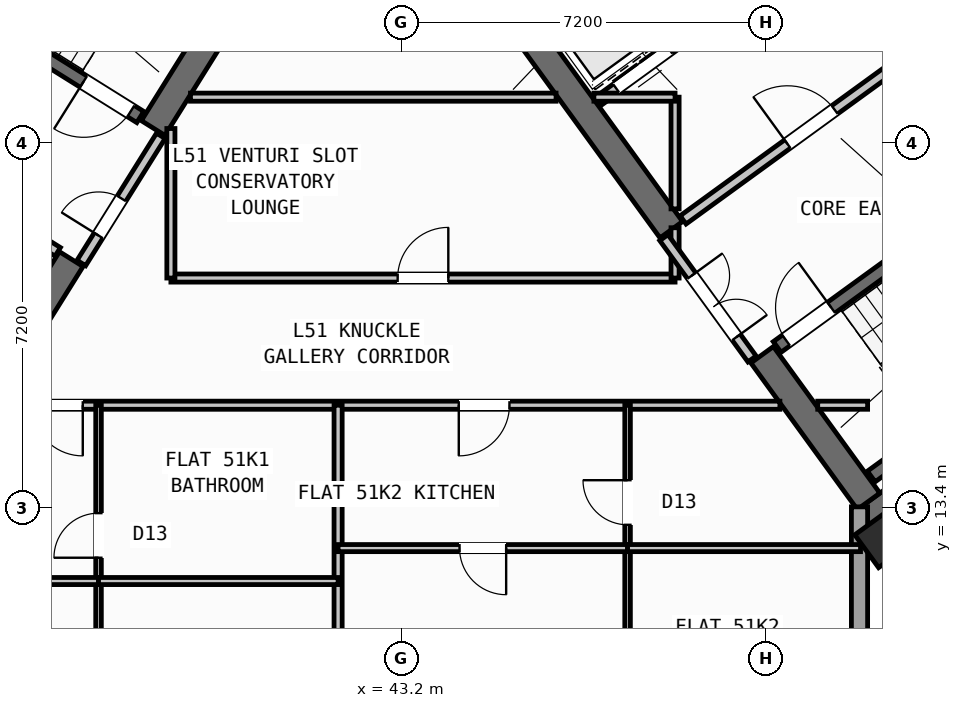
"""IFC4 building model, lengths in metres.
Left out: names, types, materials, properties, quantities, classifications, styles, units other than length and angle.
Written with IfcOpenShell. Run it as: python <this file> out.ifc"""

import sys

from ifc_helpers import new_model, si_unit, direction, frame, frame_2d, origin, origin_2d, place, context, subcontext, project, spatial, rectangle, hollow_rectangle, extrude, source, transform, mapped, element, fill, save


model = new_model("IFC4")
c1 = context("Model", 3, precision=1e-05, world=origin(), true_north=direction((0.0, 1.0)))
c2 = subcontext(c1, "Body", "Model", "MODEL_VIEW")
j1 = project(units=[si_unit("LENGTHUNIT", "METRE"), si_unit("PLANEANGLEUNIT", "RADIAN")], contexts=[c1])
p1 = place(None, origin())
s1 = spatial("IfcSite", under=j1, at=p1, CompositionType="ELEMENT")
p2 = place(p1, origin())
s2 = spatial("IfcBuilding", under=s1, at=p2, CompositionType="ELEMENT")
p3 = place(p2, frame((0.0, 0.0, 204.0)))
s3 = spatial("IfcBuildingStorey", under=s2, at=p3, CompositionType="ELEMENT", Elevation=204.0)
p4 = place(p3, frame((40.194, 23.922, 0.0), z_axis=(0.0, 0.0, 1.0), x_axis=(-0.529888438328, -0.848067357541, 0.0)))
e1 = element("IfcWall", 1, at=p4, inside=s3, PredefinedType="SHEAR", context=c2, shape_type="SweptSolid", body=[
    extrude(rectangle(XDim=3.575, YDim=0.55, at=frame_2d((1.788, 0.0))), origin(), (0.0, 0.0, 1.0), 3.35),
])
p5 = place(p3, frame((36.683, 18.304, 0.0), z_axis=(0.0, 0.0, 1.0), x_axis=(-0.529896466841, -0.848062341122, 0.0)))
e2 = element("IfcWall", 2, at=p5, inside=s3, PredefinedType="SHEAR", context=c2, shape_type="SweptSolid", body=[
    extrude(rectangle(XDim=6.425, YDim=0.55, at=frame_2d((3.212, 0.0))), origin(), (0.0, 0.0, 1.0), 3.35),
])
p6 = place(p3, frame((52.359, 13.14, 0.0), z_axis=(0.0, 0.0, 1.0), x_axis=(0.809014896919, 0.587788139183, 0.0)))
e3 = element("IfcWall", 3, at=p6, inside=s3, PredefinedType="SHEAR", context=c2, shape_type="SweptSolid", body=[
    extrude(rectangle(XDim=12.34, YDim=0.55, at=frame_2d((6.17, 0.0))), origin(), (0.0, 0.0, 1.0), 3.35),
])
p7 = place(p3, frame((52.42, 13.524, 0.0), z_axis=(0.0, 0.0, 1.0), x_axis=(-0.587802113096, 0.809004744015, 0.0)))
e4 = element("IfcWall", 4, at=p7, inside=s3, PredefinedType="SHEAR", context=c2, shape_type="SweptSolid", body=[
    extrude(rectangle(XDim=3.575, YDim=0.55, at=frame_2d((1.788, 0.0))), origin(), (0.0, 0.0, 1.0), 3.35),
])
p8 = place(p3, frame((48.526, 18.884, 0.0), z_axis=(0.0, 0.0, 1.0), x_axis=(-0.587764933797, 0.809031756236, 0.0)))
e5 = element("IfcWall", 5, at=p8, inside=s3, PredefinedType="SHEAR", context=c2, shape_type="SweptSolid", body=[
    extrude(rectangle(XDim=6.425, YDim=0.55, at=frame_2d((3.212, 0.0))), origin(), (0.0, 0.0, 1.0), 3.35),
])
m1 = source(origin(), c2, "Body", "SweptSolid", [
    extrude(hollow_rectangle(XDim=0.8, YDim=0.8, WallThickness=0.032, at=origin_2d()), origin(), (0.0, 0.0, 1.0), 3.6),
])
p9 = place(p3, frame((52.705, 12.773, 0.0), z_axis=(0.0, 0.0, 1.0), x_axis=(0.809016994375, 0.587785252292, 0.0)))
e6 = element("IfcColumn", 6, at=p9, inside=s3, PredefinedType="COLUMN", context=c2, shape_type="MappedRepresentation", body=[
    mapped(m1, transform((0.0, 0.0, 0.0), scale=1.0)),
])
p10 = place(p3, frame((52.24, 13.414, 0.0), z_axis=(0.0, 0.0, 1.0), x_axis=(0.0, -1.0, 0.0)))
e7 = element("IfcWall", 7, at=p10, inside=s3, PredefinedType="STANDARD", context=c2, shape_type="SweptSolid", body=[
    extrude(rectangle(XDim=9.948, YDim=0.32, at=frame_2d((4.974, 0.0))), origin(), (0.0, 0.0, 1.0), 3.35),
])
p11 = place(p10, frame((2.671, 0.0, 0.9)))
e8 = element("IfcOpeningElement", 8, at=p11, cuts=e7, PredefinedType="OPENING", context=c2, shape_type="SweptSolid", body=[
    extrude(rectangle(XDim=1.65, YDim=1.45, at=frame_2d((0.825, 0.725))), frame((0.0, 0.17, 0.0), z_axis=(0.0, -1.0, 0.0), x_axis=(1.0, 0.0, 0.0)), (0.0, 0.0, 1.0), 0.34),
])
p12 = place(p10, frame((7.408, 0.0, 0.9)))
e9 = element("IfcOpeningElement", 9, at=p12, cuts=e7, PredefinedType="OPENING", context=c2, shape_type="SweptSolid", body=[
    extrude(rectangle(XDim=1.35, YDim=1.45, at=frame_2d((0.675, 0.725))), frame((0.0, 0.17, 0.0), z_axis=(0.0, -1.0, 0.0), x_axis=(1.0, 0.0, 0.0)), (0.0, 0.0, 1.0), 0.34),
])
p13 = place(p3, frame((38.046, 21.108, 0.0), z_axis=(0.0, 0.0, 1.0), x_axis=(-0.848054434086, 0.529909121291, 0.0)))
e10 = element("IfcWall", 10, at=p13, inside=s3, PredefinedType="SHEAR", context=c2, shape_type="SweptSolid", body=[
    extrude(rectangle(XDim=7.33, YDim=0.26, at=frame_2d((3.665, 0.0))), origin(), (0.0, 0.0, 1.0), 3.35),
])
p14 = place(p13, frame((0.22, 0.0, 0.0)))
e11 = element("IfcOpeningElement", 11, at=p14, cuts=e10, PredefinedType="OPENING", context=c2, shape_type="SweptSolid", body=[
    extrude(rectangle(XDim=1.1, YDim=2.1, at=frame_2d((0.55, 1.05))), frame((0.0, 0.14, 0.0), z_axis=(0.0, -1.0, 0.0), x_axis=(1.0, 0.0, 0.0)), (0.0, 0.0, 1.0), 0.28),
])
p15 = place(p3, frame((36.417, 18.447, 0.0), z_axis=(0.0, 0.0, 1.0), x_axis=(-0.848064879198, 0.529892404805, 0.0)))
e12 = element("IfcWall", 12, at=p15, inside=s3, PredefinedType="STANDARD", context=c2, shape_type="SweptSolid", body=[
    extrude(rectangle(XDim=5.768, YDim=0.2, at=frame_2d((2.884, 0.0))), origin(), (0.0, 0.0, 1.0), 3.34),
])
p16 = place(p15, frame((2.548, 0.0, 0.0)))
e13 = element("IfcOpeningElement", 13, at=p16, cuts=e12, PredefinedType="OPENING", context=c2, shape_type="SweptSolid", body=[
    extrude(rectangle(XDim=1.15, YDim=2.1, at=frame_2d((0.575, 1.05))), frame((0.0, 0.11, 0.0), z_axis=(0.0, -1.0, 0.0), x_axis=(1.0, 0.0, 0.0)), (0.0, 0.0, 1.0), 0.22),
])
p17 = place(p3, frame((52.472, 14.013, 0.0), z_axis=(0.0, 0.0, 1.0), x_axis=(0.809028366311, 0.587769599847, 0.0)))
e14 = element("IfcWall", 14, at=p17, inside=s3, PredefinedType="SHEAR", context=c2, shape_type="SweptSolid", body=[
    extrude(rectangle(XDim=7.33, YDim=0.26, at=frame_2d((3.665, 0.0))), origin(), (0.0, 0.0, 1.0), 3.35),
])
p18 = place(p3, frame((50.615, 16.57, 0.0), z_axis=(0.0, 0.0, 1.0), x_axis=(0.809028366311, 0.587769599847, 0.0)))
e15 = element("IfcWall", 15, at=p18, inside=s3, PredefinedType="SHEAR", context=c2, shape_type="SweptSolid", body=[
    extrude(rectangle(XDim=7.33, YDim=0.26, at=frame_2d((3.665, 0.0))), origin(), (0.0, 0.0, 1.0), 3.35),
])
p19 = place(p18, frame((0.22, 0.0, 0.0)))
e16 = element("IfcOpeningElement", 16, at=p19, cuts=e15, PredefinedType="OPENING", context=c2, shape_type="SweptSolid", body=[
    extrude(rectangle(XDim=1.1, YDim=2.1, at=frame_2d((0.55, 1.05))), frame((0.0, 0.14, 0.0), z_axis=(0.0, -1.0, 0.0), x_axis=(1.0, 0.0, 0.0)), (0.0, 0.0, 1.0), 0.28),
])
p20 = place(p3, frame((47.065, 21.407, 0.0), z_axis=(0.0, 0.0, 1.0), x_axis=(0.809032984992, 0.587763242466, 0.0)))
e17 = element("IfcWall", 17, at=p20, inside=s3, PredefinedType="STANDARD", context=c2, shape_type="SweptSolid", body=[
    extrude(rectangle(XDim=3.448, YDim=0.2, at=frame_2d((1.724, 0.0))), origin(), (0.0, 0.0, 1.0), 3.34),
])
p21 = place(p20, frame((0.458, 0.0, 0.0)))
e18 = element("IfcOpeningElement", 18, at=p21, cuts=e17, PredefinedType="OPENING", context=c2, shape_type="SweptSolid", body=[
    extrude(rectangle(XDim=1.3, YDim=2.2, at=frame_2d((0.65, 1.1))), frame((0.0, 0.11, 0.0), z_axis=(0.0, -1.0, 0.0), x_axis=(1.0, 0.0, 0.0)), (0.0, 0.0, 1.0), 0.22),
])
p22 = place(p3, frame((48.758, 19.077, 0.0), z_axis=(0.0, 0.0, 1.0), x_axis=(0.809005065155, 0.587801671104, 0.0)))
e19 = element("IfcWall", 19, at=p22, inside=s3, PredefinedType="STANDARD", context=c2, shape_type="SweptSolid", body=[
    extrude(rectangle(XDim=5.768, YDim=0.2, at=frame_2d((2.884, 0.0))), origin(), (0.0, 0.0, 1.0), 3.34),
])
p23 = place(p22, frame((2.548, 0.0, 0.0)))
e20 = element("IfcOpeningElement", 20, at=p23, cuts=e19, PredefinedType="OPENING", context=c2, shape_type="SweptSolid", body=[
    extrude(rectangle(XDim=1.15, YDim=2.1, at=frame_2d((0.575, 1.05))), frame((0.0, 0.11, 0.0), z_axis=(0.0, -1.0, 0.0), x_axis=(1.0, 0.0, 0.0)), (0.0, 0.0, 1.0), 0.22),
])
p24 = place(p3, frame((38.451, 20.737, 0.0), z_axis=(0.0, 0.0, 1.0), x_axis=(-0.529924799939, -0.848044637038, 0.0)))
e21 = element("IfcWall", 21, at=p24, inside=s3, PredefinedType="STANDARD", context=c2, shape_type="SweptSolid", body=[
    extrude(rectangle(XDim=2.96, YDim=0.2, at=frame_2d((1.48, 0.0))), origin(), (0.0, 0.0, 1.0), 3.34),
])
p25 = place(p24, frame((1.46, 0.0, 0.0)))
e22 = element("IfcOpeningElement", 22, at=p25, cuts=e21, PredefinedType="OPENING", context=c2, shape_type="SweptSolid", body=[
    extrude(rectangle(XDim=0.86, YDim=2.05, at=frame_2d((0.43, 1.025))), frame((0.0, 0.11, 0.0), z_axis=(0.0, -1.0, 0.0), x_axis=(1.0, 0.0, 0.0)), (0.0, 0.0, 1.0), 0.22),
])
p26 = place(p3, frame((35.237, 15.42, 0.0), z_axis=(0.0, 0.0, 1.0), x_axis=(1.0, 0.0, 0.0)))
e23 = element("IfcWall", 23, at=p26, inside=s3, PredefinedType="PARTITIONING", context=c2, shape_type="SweptSolid", body=[
    extrude(rectangle(XDim=15.432, YDim=0.16, at=frame_2d((7.716, 0.0))), origin(), (0.0, 0.0, 1.0), 3.34),
])
p27 = place(p26, frame((0.674, 0.0, 0.0)))
e24 = element("IfcOpeningElement", 24, at=p27, cuts=e23, PredefinedType="OPENING", context=c2, shape_type="SweptSolid", body=[
    extrude(rectangle(XDim=1.0, YDim=2.1, at=frame_2d((0.5, 1.05))), frame((0.0, 0.09, 0.0), z_axis=(0.0, -1.0, 0.0), x_axis=(1.0, 0.0, 0.0)), (0.0, 0.0, 1.0), 0.18),
])
p28 = place(p26, frame((9.094, 0.0, 0.0)))
e25 = element("IfcOpeningElement", 25, at=p28, cuts=e23, PredefinedType="OPENING", context=c2, shape_type="SweptSolid", body=[
    extrude(rectangle(XDim=1.0, YDim=2.1, at=frame_2d((0.5, 1.05))), frame((0.0, 0.09, 0.0), z_axis=(0.0, -1.0, 0.0), x_axis=(1.0, 0.0, 0.0)), (0.0, 0.0, 1.0), 0.18),
])
p29 = place(p3, frame((51.416, 15.42, 0.0), z_axis=(0.0, 0.0, 1.0), x_axis=(1.0, 0.0, 0.0)))
e26 = element("IfcWall", 26, at=p29, inside=s3, PredefinedType="PARTITIONING", context=c2, shape_type="SweptSolid", body=[
    extrude(rectangle(XDim=0.984, YDim=0.16, at=frame_2d((0.492, 0.0))), origin(), (0.0, 0.0, 1.0), 3.34),
])
p30 = place(p3, frame((38.65, 17.93, 0.0), z_axis=(0.0, 0.0, 1.0), x_axis=(1.0, 0.0, 0.0)))
e27 = element("IfcWall", 27, at=p30, inside=s3, PredefinedType="PARTITIONING", context=c2, shape_type="SweptSolid", body=[
    extrude(rectangle(XDim=9.95, YDim=0.16, at=frame_2d((4.975, 0.0))), origin(), (0.0, 0.0, 1.0), 3.34),
])
p31 = place(p30, frame((4.475, 0.0, 0.0)))
e28 = element("IfcOpeningElement", 28, at=p31, cuts=e27, PredefinedType="OPENING", context=c2, shape_type="SweptSolid", body=[
    extrude(rectangle(XDim=1.0, YDim=2.1, at=frame_2d((0.5, 1.05))), frame((0.0, 0.09, 0.0), z_axis=(0.0, -1.0, 0.0), x_axis=(1.0, 0.0, 0.0)), (0.0, 0.0, 1.0), 0.18),
])
p32 = place(p3, frame((38.65, 17.93, 0.0), z_axis=(0.0, 0.0, 1.0), x_axis=(0.0, 1.0, 0.0)))
e29 = element("IfcWall", 29, at=p32, inside=s3, PredefinedType="PARTITIONING", context=c2, shape_type="SweptSolid", body=[
    extrude(rectangle(XDim=2.951, YDim=0.16, at=frame_2d((1.476, 0.0))), origin(), (0.0, 0.0, 1.0), 3.34),
])
p33 = place(p3, frame((48.6, 17.93, 0.0), z_axis=(0.0, 0.0, 1.0), x_axis=(0.0, 1.0, 0.0)))
e30 = element("IfcWall", 30, at=p33, inside=s3, PredefinedType="PARTITIONING", context=c2, shape_type="SweptSolid", body=[
    extrude(rectangle(XDim=0.993, YDim=0.16, at=frame_2d((0.496, 0.0))), origin(), (0.0, 0.0, 1.0), 3.34),
])
p34 = place(p3, frame((48.6, 19.295, 0.0), z_axis=(0.0, 0.0, 1.0), x_axis=(0.0, 1.0, 0.0)))
e31 = element("IfcWall", 31, at=p34, inside=s3, PredefinedType="PARTITIONING", context=c2, shape_type="SweptSolid", body=[
    extrude(rectangle(XDim=2.205, YDim=0.16, at=frame_2d((1.103, 0.0))), origin(), (0.0, 0.0, 1.0), 3.34),
])
p35 = place(p3, frame((39.037, 21.5, 0.0), z_axis=(0.0, 0.0, 1.0), x_axis=(1.0, 0.0, 0.0)))
e32 = element("IfcWall", 32, at=p35, inside=s3, PredefinedType="PARTITIONING", context=c2, shape_type="SweptSolid", body=[
    extrude(rectangle(XDim=7.215, YDim=0.16, at=frame_2d((3.607, 0.0))), origin(), (0.0, 0.0, 1.0), 3.34),
])
p36 = place(p3, frame((46.998, 21.5, 0.0), z_axis=(0.0, 0.0, 1.0), x_axis=(1.0, 0.0, 0.0)))
e33 = element("IfcWall", 33, at=p36, inside=s3, PredefinedType="PARTITIONING", context=c2, shape_type="SweptSolid", body=[
    extrude(rectangle(XDim=1.602, YDim=0.16, at=frame_2d((0.801, 0.0))), origin(), (0.0, 0.0, 1.0), 3.34),
])
p37 = place(p3, frame((50.119, 16.333, 0.0), z_axis=(0.0, 0.0, 1.0), x_axis=(-0.587749856981, 0.809042709391, 0.0)))
e34 = element("IfcWall", 34, at=p37, inside=s3, PredefinedType="STANDARD", context=c2, shape_type="SweptSolid", body=[
    extrude(rectangle(XDim=2.96, YDim=0.2, at=frame_2d((1.48, 0.0))), origin(), (0.0, 0.0, 1.0), 3.34),
])
p38 = place(p37, frame((0.53, 0.0, 0.0)))
e35 = element("IfcOpeningElement", 35, at=p38, cuts=e34, PredefinedType="OPENING", context=c2, shape_type="SweptSolid", body=[
    extrude(rectangle(XDim=1.5, YDim=2.15, at=frame_2d((0.75, 1.075))), frame((0.0, 0.11, 0.0), z_axis=(0.0, -1.0, 0.0), x_axis=(1.0, 0.0, 0.0)), (0.0, 0.0, 1.0), 0.22),
])
p39 = place(p3, frame((41.95, 1.96, 0.0), z_axis=(0.0, 0.0, 1.0), x_axis=(0.0, 1.0, 0.0)))
e36 = element("IfcWall", 36, at=p39, inside=s3, PredefinedType="PARTITIONING", context=c2, shape_type="SweptSolid", body=[
    extrude(rectangle(XDim=13.46, YDim=0.16, at=frame_2d((6.73, 0.0))), origin(), (0.0, 0.0, 1.0), 3.34),
])
p40 = place(p3, frame((37.222, 1.96, 0.0), z_axis=(0.0, 0.0, 1.0), x_axis=(0.0, 1.0, 0.0)))
e37 = element("IfcWall", 37, at=p40, inside=s3, PredefinedType="PARTITIONING", context=c2, shape_type="SweptSolid", body=[
    extrude(rectangle(XDim=13.46, YDim=0.11, at=frame_2d((6.73, 0.0))), origin(), (0.0, 0.0, 1.0), 3.34),
])
p41 = place(p40, frame((5.2, 0.0, 0.0)))
e38 = element("IfcOpeningElement", 38, at=p41, cuts=e37, PredefinedType="OPENING", context=c2, shape_type="SweptSolid", body=[
    extrude(rectangle(XDim=0.92, YDim=2.08, at=frame_2d((0.46, 1.04))), frame((0.0, 0.065, 0.0), z_axis=(0.0, -1.0, 0.0), x_axis=(1.0, 0.0, 0.0)), (0.0, 0.0, 1.0), 0.13),
])
p42 = place(p40, frame((10.45, 0.0, 0.0)))
e39 = element("IfcOpeningElement", 39, at=p42, cuts=e37, PredefinedType="OPENING", context=c2, shape_type="SweptSolid", body=[
    extrude(rectangle(XDim=0.88, YDim=2.08, at=frame_2d((0.44, 1.04))), frame((0.0, 0.065, 0.0), z_axis=(0.0, -1.0, 0.0), x_axis=(1.0, 0.0, 0.0)), (0.0, 0.0, 1.0), 0.13),
])
p43 = place(p3, frame((33.447, 11.95, 0.0), z_axis=(0.0, 0.0, 1.0), x_axis=(1.0, 0.0, 0.0)))
e40 = element("IfcWall", 40, at=p43, inside=s3, PredefinedType="PLUMBINGWALL", context=c2, shape_type="SweptSolid", body=[
    extrude(rectangle(XDim=3.775, YDim=0.14, at=frame_2d((1.888, 0.0))), origin(), (0.0, 0.0, 1.0), 2.525),
])
p44 = place(p43, frame((0.755, 0.0, 0.0)))
e41 = element("IfcOpeningElement", 41, at=p44, cuts=e40, PredefinedType="OPENING", context=c2, shape_type="SweptSolid", body=[
    extrude(rectangle(XDim=0.92, YDim=2.08, at=frame_2d((0.46, 1.04))), frame((0.0, 0.08, 0.0), z_axis=(0.0, -1.0, 0.0), x_axis=(1.0, 0.0, 0.0)), (0.0, 0.0, 1.0), 0.16),
])
p45 = place(p3, frame((37.222, 11.95, 0.0), z_axis=(0.0, 0.0, 1.0), x_axis=(1.0, 0.0, 0.0)))
e42 = element("IfcWall", 42, at=p45, inside=s3, PredefinedType="PLUMBINGWALL", context=c2, shape_type="SweptSolid", body=[
    extrude(rectangle(XDim=4.728, YDim=0.14, at=frame_2d((2.364, 0.0))), origin(), (0.0, 0.0, 1.0), 2.525),
])
p46 = place(p3, frame((47.663, 1.96, 0.0), z_axis=(0.0, 0.0, 1.0), x_axis=(0.0, 1.0, 0.0)))
e43 = element("IfcWall", 43, at=p46, inside=s3, PredefinedType="PARTITIONING", context=c2, shape_type="SweptSolid", body=[
    extrude(rectangle(XDim=13.46, YDim=0.11, at=frame_2d((6.73, 0.0))), origin(), (0.0, 0.0, 1.0), 3.34),
])
p47 = place(p46, frame((6.3, 0.0, 0.0)))
e44 = element("IfcOpeningElement", 44, at=p47, cuts=e43, PredefinedType="OPENING", context=c2, shape_type="SweptSolid", body=[
    extrude(rectangle(XDim=0.92, YDim=2.08, at=frame_2d((0.46, 1.04))), frame((0.0, 0.065, 0.0), z_axis=(0.0, -1.0, 0.0), x_axis=(1.0, 0.0, 0.0)), (0.0, 0.0, 1.0), 0.13),
])
p48 = place(p46, frame((11.1, 0.0, 0.0)))
e45 = element("IfcOpeningElement", 45, at=p48, cuts=e43, PredefinedType="OPENING", context=c2, shape_type="SweptSolid", body=[
    extrude(rectangle(XDim=0.88, YDim=2.08, at=frame_2d((0.44, 1.04))), frame((0.0, 0.065, 0.0), z_axis=(0.0, -1.0, 0.0), x_axis=(1.0, 0.0, 0.0)), (0.0, 0.0, 1.0), 0.13),
])
p49 = place(p3, frame((41.95, 12.6, 0.0), z_axis=(0.0, 0.0, 1.0), x_axis=(1.0, 0.0, 0.0)))
e46 = element("IfcWall", 46, at=p49, inside=s3, PredefinedType="PLUMBINGWALL", context=c2, shape_type="SweptSolid", body=[
    extrude(rectangle(XDim=5.713, YDim=0.14, at=frame_2d((2.856, 0.0))), origin(), (0.0, 0.0, 1.0), 2.525),
])
p50 = place(p49, frame((2.396, 0.0, 0.0)))
e47 = element("IfcOpeningElement", 47, at=p50, cuts=e46, PredefinedType="OPENING", context=c2, shape_type="SweptSolid", body=[
    extrude(rectangle(XDim=0.92, YDim=2.08, at=frame_2d((0.46, 1.04))), frame((0.0, 0.08, 0.0), z_axis=(0.0, -1.0, 0.0), x_axis=(1.0, 0.0, 0.0)), (0.0, 0.0, 1.0), 0.16),
])
p51 = place(p3, frame((47.663, 12.6, 0.0), z_axis=(0.0, 0.0, 1.0), x_axis=(1.0, 0.0, 0.0)))
e48 = element("IfcWall", 48, at=p51, inside=s3, PredefinedType="PLUMBINGWALL", context=c2, shape_type="SweptSolid", body=[
    extrude(rectangle(XDim=4.597, YDim=0.14, at=frame_2d((2.298, 0.0))), origin(), (0.0, 0.0, 1.0), 2.525),
])
m2 = source(origin(), c2, "Body", "SweptSolid", [
    extrude(rectangle(XDim=1.1, YDim=2.1, at=frame_2d((0.55, 1.05))), frame((0.0, 0.025, 0.0), z_axis=(0.0, -1.0, 0.0), x_axis=(1.0, 0.0, 0.0)), (0.0, 0.0, 1.0), 0.05),
])
p52 = place(p14, origin())
e49 = element("IfcDoor", 49, at=p52, inside=s3, OperationType="SINGLE_SWING_RIGHT", PredefinedType="DOOR", context=c2, shape_type="MappedRepresentation", body=[
    mapped(m2, transform((0.0, 0.0, 0.0), scale=1.0)),
])
fill(e11, e49)
p53 = place(p19, origin())
e50 = element("IfcDoor", 50, at=p53, inside=s3, OperationType="SINGLE_SWING_RIGHT", PredefinedType="DOOR", context=c2, shape_type="MappedRepresentation", body=[
    mapped(m2, transform((0.0, 0.0, 0.0), scale=1.0)),
])
fill(e16, e50)
m3 = source(origin(), c2, "Body", "SweptSolid", [
    extrude(rectangle(XDim=1.15, YDim=2.1, at=frame_2d((0.575, 1.05))), frame((0.0, 0.025, 0.0), z_axis=(0.0, -1.0, 0.0), x_axis=(1.0, 0.0, 0.0)), (0.0, 0.0, 1.0), 0.05),
])
p54 = place(p23, origin())
e51 = element("IfcDoor", 51, at=p54, inside=s3, OperationType="SINGLE_SWING_LEFT", PredefinedType="DOOR", context=c2, shape_type="MappedRepresentation", body=[
    mapped(m3, transform((0.0, 0.0, 0.0), scale=1.0)),
])
fill(e20, e51)
m4 = source(origin(), c2, "Body", "SweptSolid", [
    extrude(rectangle(XDim=1.3, YDim=2.2, at=frame_2d((0.65, 1.1))), frame((0.0, 0.025, 0.0), z_axis=(0.0, -1.0, 0.0), x_axis=(1.0, 0.0, 0.0)), (0.0, 0.0, 1.0), 0.05),
])
p55 = place(p21, origin())
e52 = element("IfcDoor", 52, at=p55, inside=s3, OperationType="DOUBLE_DOOR_SLIDING", PredefinedType="DOOR", context=c2, shape_type="MappedRepresentation", body=[
    mapped(m4, transform((0.0, 0.0, 0.0), scale=1.0)),
])
fill(e18, e52)
m5 = source(origin(), c2, "Body", "SweptSolid", [
    extrude(rectangle(XDim=1.0, YDim=2.1, at=frame_2d((0.5, 1.05))), frame((0.0, 0.025, 0.0), z_axis=(0.0, -1.0, 0.0), x_axis=(1.0, 0.0, 0.0)), (0.0, 0.0, 1.0), 0.05),
])
p56 = place(p31, origin())
e53 = element("IfcDoor", 53, at=p56, inside=s3, OperationType="SINGLE_SWING_RIGHT", PredefinedType="DOOR", context=c2, shape_type="MappedRepresentation", body=[
    mapped(m5, transform((0.0, 0.0, 0.0), scale=1.0)),
])
fill(e28, e53)
m6 = source(origin(), c2, "Body", "SweptSolid", [
    extrude(rectangle(XDim=0.86, YDim=2.05, at=frame_2d((0.43, 1.025))), frame((0.0, 0.025, 0.0), z_axis=(0.0, -1.0, 0.0), x_axis=(1.0, 0.0, 0.0)), (0.0, 0.0, 1.0), 0.05),
])
p57 = place(p25, frame((0.86, 0.0, 0.0), z_axis=(0.0, 0.0, 1.0), x_axis=(-1.0, 0.0, 0.0)))
e54 = element("IfcDoor", 54, at=p57, inside=s3, OperationType="SINGLE_SWING_LEFT", PredefinedType="DOOR", context=c2, shape_type="MappedRepresentation", body=[
    mapped(m6, transform((0.0, 0.0, 0.0), scale=1.0)),
])
fill(e22, e54)
m7 = source(origin(), c2, "Body", "SweptSolid", [
    extrude(rectangle(XDim=1.5, YDim=2.15, at=frame_2d((0.75, 1.075))), frame((0.0, 0.025, 0.0), z_axis=(0.0, -1.0, 0.0), x_axis=(1.0, 0.0, 0.0)), (0.0, 0.0, 1.0), 0.05),
])
p58 = place(p38, frame((1.5, 0.0, 0.0), z_axis=(0.0, 0.0, 1.0), x_axis=(-1.0, 0.0, 0.0)))
e55 = element("IfcDoor", 55, at=p58, inside=s3, OperationType="DOUBLE_DOOR_SINGLE_SWING", PredefinedType="DOOR", context=c2, shape_type="MappedRepresentation", body=[
    mapped(m7, transform((0.0, 0.0, 0.0), scale=1.0)),
])
fill(e35, e55)
p59 = place(p27, frame((1.0, 0.0, 0.0), z_axis=(0.0, 0.0, 1.0), x_axis=(-1.0, 0.0, 0.0)))
e56 = element("IfcDoor", 56, at=p59, inside=s3, OperationType="SINGLE_SWING_LEFT", PredefinedType="DOOR", context=c2, shape_type="MappedRepresentation", body=[
    mapped(m5, transform((0.0, 0.0, 0.0), scale=1.0)),
])
fill(e24, e56)
m8 = source(origin(), c2, "Body", "SweptSolid", [
    extrude(rectangle(XDim=0.88, YDim=2.08, at=frame_2d((0.44, 1.04))), frame((0.0, 0.025, 0.0), z_axis=(0.0, -1.0, 0.0), x_axis=(1.0, 0.0, 0.0)), (0.0, 0.0, 1.0), 0.05),
])
p60 = place(p42, origin())
e57 = element("IfcDoor", 57, at=p60, inside=s3, OperationType="SINGLE_SWING_LEFT", PredefinedType="DOOR", context=c2, shape_type="MappedRepresentation", body=[
    mapped(m8, transform((0.0, 0.0, 0.0), scale=1.0)),
])
fill(e39, e57)
p61 = place(p28, frame((1.0, 0.0, 0.0), z_axis=(0.0, 0.0, 1.0), x_axis=(-1.0, 0.0, 0.0)))
e58 = element("IfcDoor", 58, at=p61, inside=s3, OperationType="SINGLE_SWING_RIGHT", PredefinedType="DOOR", context=c2, shape_type="MappedRepresentation", body=[
    mapped(m5, transform((0.0, 0.0, 0.0), scale=1.0)),
])
fill(e25, e58)
m9 = source(origin(), c2, "Body", "SweptSolid", [
    extrude(rectangle(XDim=0.92, YDim=2.08, at=frame_2d((0.46, 1.04))), frame((0.0, 0.025, 0.0), z_axis=(0.0, -1.0, 0.0), x_axis=(1.0, 0.0, 0.0)), (0.0, 0.0, 1.0), 0.05),
])
p62 = place(p50, frame((0.92, 0.0, 0.0), z_axis=(0.0, 0.0, 1.0), x_axis=(-1.0, 0.0, 0.0)))
e59 = element("IfcDoor", 59, at=p62, inside=s3, OperationType="SINGLE_SWING_LEFT", PredefinedType="DOOR", context=c2, shape_type="MappedRepresentation", body=[
    mapped(m9, transform((0.0, 0.0, 0.0), scale=1.0)),
])
fill(e47, e59)
p63 = place(p48, origin())
e60 = element("IfcDoor", 60, at=p63, inside=s3, OperationType="SINGLE_SWING_RIGHT", PredefinedType="DOOR", context=c2, shape_type="MappedRepresentation", body=[
    mapped(m8, transform((0.0, 0.0, 0.0), scale=1.0)),
])
fill(e45, e60)
save(model, sys.argv[1])
